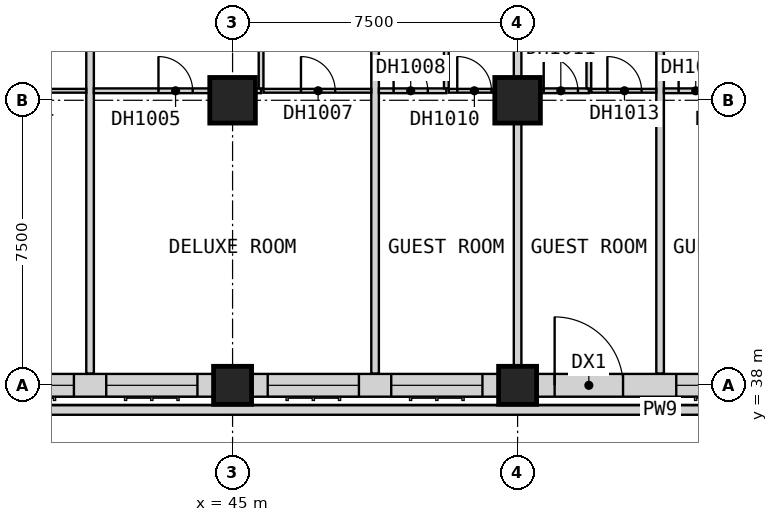
"""IFC4 building model, lengths in metres.
Left out: names, types, materials, properties, quantities, classifications, styles, units other than length and angle.
Written with IfcOpenShell. Run it as: python <this file> out.ifc"""

import sys

from ifc_helpers import new_model, si_unit, direction, frame, frame_2d, origin, origin_2d, place, context, subcontext, project, spatial, rectangle, extrude, element, fill, save


model = new_model("IFC4")
c1 = context("Model", 3, precision=1e-05, world=origin(), true_north=direction((0.0, 1.0)))
c2 = subcontext(c1, "Body", "Model", "MODEL_VIEW")
j1 = project(units=[si_unit("LENGTHUNIT", "METRE"), si_unit("PLANEANGLEUNIT", "RADIAN")], contexts=[c1])
p1 = place(None, origin())
s1 = spatial("IfcSite", under=j1, at=p1, CompositionType="ELEMENT")
p2 = place(p1, origin())
s2 = spatial("IfcBuilding", under=s1, at=p2, CompositionType="ELEMENT")
p3 = place(p2, frame((0.0, 0.0, 34.0)))
s3 = spatial("IfcBuildingStorey", under=s2, at=p3, CompositionType="ELEMENT", Elevation=34.0)
p4 = place(p3, frame((45.0, 38.0, 0.0), z_axis=(0.0, 0.0, 1.0), x_axis=(1.0, 0.0, 0.0)))
e1 = element("IfcColumn", 1, at=p4, inside=s3, PredefinedType="COLUMN", context=c2, shape_type="SweptSolid", body=[
    extrude(rectangle(XDim=1.0, YDim=1.0, at=origin_2d()), origin(), (0.0, 0.0, 1.0), 3.6),
])
p5 = place(p3, frame((45.0, 45.5, 0.0), z_axis=(0.0, 0.0, 1.0), x_axis=(1.0, 0.0, 0.0)))
e2 = element("IfcColumn", 2, at=p5, inside=s3, PredefinedType="COLUMN", context=c2, shape_type="SweptSolid", body=[
    extrude(rectangle(XDim=1.2, YDim=1.2, at=origin_2d()), origin(), (0.0, 0.0, 1.0), 3.6),
])
p6 = place(p3, frame((52.5, 38.0, 0.0), z_axis=(0.0, 0.0, 1.0), x_axis=(1.0, 0.0, 0.0)))
e3 = element("IfcColumn", 3, at=p6, inside=s3, PredefinedType="COLUMN", context=c2, shape_type="SweptSolid", body=[
    extrude(rectangle(XDim=1.0, YDim=1.0, at=origin_2d()), origin(), (0.0, 0.0, 1.0), 3.6),
])
p7 = place(p3, frame((52.5, 45.5, 0.0), z_axis=(0.0, 0.0, 1.0), x_axis=(1.0, 0.0, 0.0)))
e4 = element("IfcColumn", 4, at=p7, inside=s3, PredefinedType="COLUMN", context=c2, shape_type="SweptSolid", body=[
    extrude(rectangle(XDim=1.2, YDim=1.2, at=origin_2d()), origin(), (0.0, 0.0, 1.0), 3.6),
])
p8 = place(p3, frame((38.0, 38.0, 0.0), z_axis=(0.0, 0.0, 1.0), x_axis=(1.0, 0.0, 0.0)))
e5 = element("IfcWall", 5, at=p8, inside=s3, PredefinedType="SOLIDWALL", context=c2, shape_type="SweptSolid", body=[
    extrude(rectangle(XDim=6.5, YDim=0.6, at=frame_2d((3.25, 0.0))), origin(), (0.0, 0.0, 1.0), 2.85),
])
p9 = place(p8, frame((0.425, 0.0, 0.8)))
e6 = element("IfcOpeningElement", 6, at=p9, cuts=e5, PredefinedType="OPENING", context=c2, shape_type="SweptSolid", body=[
    extrude(rectangle(XDim=2.4, YDim=1.8, at=frame_2d((1.2, 0.9))), frame((0.0, 0.31, 0.0), z_axis=(0.0, -1.0, 0.0), x_axis=(1.0, 0.0, 0.0)), (0.0, 0.0, 1.0), 0.62),
])
p10 = place(p8, frame((3.675, 0.0, 0.8)))
e7 = element("IfcOpeningElement", 7, at=p10, cuts=e5, PredefinedType="OPENING", context=c2, shape_type="SweptSolid", body=[
    extrude(rectangle(XDim=2.4, YDim=1.8, at=frame_2d((1.2, 0.9))), frame((0.0, 0.31, 0.0), z_axis=(0.0, -1.0, 0.0), x_axis=(1.0, 0.0, 0.0)), (0.0, 0.0, 1.0), 0.62),
])
p11 = place(p3, frame((45.5, 38.0, 0.0), z_axis=(0.0, 0.0, 1.0), x_axis=(1.0, 0.0, 0.0)))
e8 = element("IfcWall", 8, at=p11, inside=s3, PredefinedType="SOLIDWALL", context=c2, shape_type="SweptSolid", body=[
    extrude(rectangle(XDim=6.5, YDim=0.6, at=frame_2d((3.25, 0.0))), origin(), (0.0, 0.0, 1.0), 2.85),
])
p12 = place(p11, frame((0.425, 0.0, 0.8)))
e9 = element("IfcOpeningElement", 9, at=p12, cuts=e8, PredefinedType="OPENING", context=c2, shape_type="SweptSolid", body=[
    extrude(rectangle(XDim=2.4, YDim=1.8, at=frame_2d((1.2, 0.9))), frame((0.0, 0.31, 0.0), z_axis=(0.0, -1.0, 0.0), x_axis=(1.0, 0.0, 0.0)), (0.0, 0.0, 1.0), 0.62),
])
p13 = place(p11, frame((3.675, 0.0, 0.8)))
e10 = element("IfcOpeningElement", 10, at=p13, cuts=e8, PredefinedType="OPENING", context=c2, shape_type="SweptSolid", body=[
    extrude(rectangle(XDim=2.4, YDim=1.8, at=frame_2d((1.2, 0.9))), frame((0.0, 0.31, 0.0), z_axis=(0.0, -1.0, 0.0), x_axis=(1.0, 0.0, 0.0)), (0.0, 0.0, 1.0), 0.62),
])
p14 = place(p3, frame((53.0, 38.0, 0.0), z_axis=(0.0, 0.0, 1.0), x_axis=(1.0, 0.0, 0.0)))
e11 = element("IfcWall", 11, at=p14, inside=s3, PredefinedType="SOLIDWALL", context=c2, shape_type="SweptSolid", body=[
    extrude(rectangle(XDim=6.5, YDim=0.6, at=frame_2d((3.25, 0.0))), origin(), (0.0, 0.0, 1.0), 2.85),
])
p15 = place(p14, frame((0.475, 0.0, 0.0)))
e12 = element("IfcOpeningElement", 12, at=p15, cuts=e11, PredefinedType="OPENING", context=c2, shape_type="SweptSolid", body=[
    extrude(rectangle(XDim=1.8, YDim=2.4, at=frame_2d((0.9, 1.2))), frame((0.0, 0.31, 0.0), z_axis=(0.0, -1.0, 0.0), x_axis=(1.0, 0.0, 0.0)), (0.0, 0.0, 1.0), 0.62),
])
p16 = place(p14, frame((3.675, 0.0, 0.8)))
e13 = element("IfcOpeningElement", 13, at=p16, cuts=e11, PredefinedType="OPENING", context=c2, shape_type="SweptSolid", body=[
    extrude(rectangle(XDim=2.4, YDim=1.8, at=frame_2d((1.2, 0.9))), frame((0.0, 0.31, 0.0), z_axis=(0.0, -1.0, 0.0), x_axis=(1.0, 0.0, 0.0)), (0.0, 0.0, 1.0), 0.62),
])
for number, where, z_axis, x_axis in (
    (14, (41.25, 38.31, 0.0), (0.0, 0.0, 1.0), (0.0, 1.0, 0.0)),
    (15, (48.75, 38.31, 0.0), (0.0, 0.0, 1.0), (0.0, 1.0, 0.0)),
):
    element("IfcWall", number, at=place(p3, frame(where, z_axis=z_axis, x_axis=x_axis)), inside=s3, PredefinedType="PARTITIONING", context=c2, shape_type="SweptSolid", body=[
        extrude(rectangle(XDim=11.715, YDim=0.2, at=frame_2d((5.857, 0.0))), origin(), (0.0, 0.0, 1.0), 3.35),
    ])
p17 = place(p3, frame((52.5, 37.5, 0.0), z_axis=(0.0, 0.0, 1.0), x_axis=(0.0, 1.0, 0.0)))
e16 = element("IfcWall", 16, at=p17, inside=s3, PredefinedType="PARTITIONING", context=c2, shape_type="SweptSolid", body=[
    extrude(rectangle(XDim=12.525, YDim=0.2, at=frame_2d((6.262, 0.0))), origin(), (0.0, 0.0, 1.0), 3.35),
])
p18 = place(p3, frame((56.25, 38.31, 0.0), z_axis=(0.0, 0.0, 1.0), x_axis=(0.0, 1.0, 0.0)))
e17 = element("IfcWall", 17, at=p18, inside=s3, PredefinedType="PARTITIONING", context=c2, shape_type="SweptSolid", body=[
    extrude(rectangle(XDim=11.715, YDim=0.2, at=frame_2d((5.857, 0.0))), origin(), (0.0, 0.0, 1.0), 3.35),
])
p19 = place(p3, frame((33.812, 45.75, 0.0), z_axis=(0.0, 0.0, 1.0), x_axis=(1.0, 0.0, 0.0)))
e18 = element("IfcWall", 18, at=p19, inside=s3, PredefinedType="PARTITIONING", context=c2, shape_type="SweptSolid", body=[
    extrude(rectangle(XDim=7.337, YDim=0.1, at=frame_2d((3.669, 0.0))), origin(), (0.0, 0.0, 1.0), 3.35),
])
p20 = place(p19, frame((5.113, 0.0, 0.0)))
e19 = element("IfcOpeningElement", 19, at=p20, cuts=e18, PredefinedType="OPENING", context=c2, shape_type="SweptSolid", body=[
    extrude(rectangle(XDim=0.9, YDim=2.1, at=frame_2d((0.45, 1.05))), frame((0.0, 0.06, 0.0), z_axis=(0.0, -1.0, 0.0), x_axis=(1.0, 0.0, 0.0)), (0.0, 0.0, 1.0), 0.12),
])
p21 = place(p3, frame((45.812, 45.75, 0.0), z_axis=(0.0, 0.0, 1.0), x_axis=(1.0, 0.0, 0.0)))
e20 = element("IfcWall", 20, at=p21, inside=s3, PredefinedType="PARTITIONING", context=c2, shape_type="SweptSolid", body=[
    extrude(rectangle(XDim=2.837, YDim=0.1, at=frame_2d((1.419, 0.0))), origin(), (0.0, 0.0, 1.0), 3.35),
])
p22 = place(p21, frame((0.988, 0.0, 0.0)))
e21 = element("IfcOpeningElement", 21, at=p22, cuts=e20, PredefinedType="OPENING", context=c2, shape_type="SweptSolid", body=[
    extrude(rectangle(XDim=0.9, YDim=2.1, at=frame_2d((0.45, 1.05))), frame((0.0, 0.06, 0.0), z_axis=(0.0, -1.0, 0.0), x_axis=(1.0, 0.0, 0.0)), (0.0, 0.0, 1.0), 0.12),
])
p23 = place(p3, frame((50.688, 45.75, 0.0), z_axis=(0.0, 0.0, 1.0), x_axis=(1.0, 0.0, 0.0)))
e22 = element("IfcWall", 22, at=p23, inside=s3, PredefinedType="PARTITIONING", context=c2, shape_type="SweptSolid", body=[
    extrude(rectangle(XDim=1.712, YDim=0.1, at=frame_2d((0.856, 0.0))), origin(), (0.0, 0.0, 1.0), 3.35),
])
p24 = place(p23, frame((0.225, 0.0, 0.0)))
e23 = element("IfcOpeningElement", 23, at=p24, cuts=e22, PredefinedType="OPENING", context=c2, shape_type="SweptSolid", body=[
    extrude(rectangle(XDim=0.9, YDim=2.1, at=frame_2d((0.45, 1.05))), frame((0.0, 0.06, 0.0), z_axis=(0.0, -1.0, 0.0), x_axis=(1.0, 0.0, 0.0)), (0.0, 0.0, 1.0), 0.12),
])
p25 = place(p3, frame((54.438, 45.75, 0.0), z_axis=(0.0, 0.0, 1.0), x_axis=(1.0, 0.0, 0.0)))
e24 = element("IfcWall", 24, at=p25, inside=s3, PredefinedType="PARTITIONING", context=c2, shape_type="SweptSolid", body=[
    extrude(rectangle(XDim=1.712, YDim=0.1, at=frame_2d((0.856, 0.0))), origin(), (0.0, 0.0, 1.0), 3.35),
])
p26 = place(p25, frame((0.425, 0.0, 0.0)))
e25 = element("IfcOpeningElement", 25, at=p26, cuts=e24, PredefinedType="OPENING", context=c2, shape_type="SweptSolid", body=[
    extrude(rectangle(XDim=0.9, YDim=2.1, at=frame_2d((0.45, 1.05))), frame((0.0, 0.06, 0.0), z_axis=(0.0, -1.0, 0.0), x_axis=(1.0, 0.0, 0.0)), (0.0, 0.0, 1.0), 0.12),
])
p27 = place(p3, frame((41.35, 45.75, 0.0), z_axis=(0.0, 0.0, 1.0), x_axis=(1.0, 0.0, 0.0)))
e26 = element("IfcWall", 26, at=p27, inside=s3, PredefinedType="PARTITIONING", context=c2, shape_type="SweptSolid", body=[
    extrude(rectangle(XDim=4.4, YDim=0.125, at=frame_2d((2.2, 0.0))), origin(), (0.0, 0.0, 1.0), 3.35),
])
p28 = place(p27, frame((1.7, 0.0, 0.0)))
e27 = element("IfcOpeningElement", 27, at=p28, cuts=e26, PredefinedType="OPENING", context=c2, shape_type="SweptSolid", body=[
    extrude(rectangle(XDim=0.9, YDim=2.1, at=frame_2d((0.45, 1.05))), frame((0.0, 0.073, 0.0), z_axis=(0.0, -1.0, 0.0), x_axis=(1.0, 0.0, 0.0)), (0.0, 0.0, 1.0), 0.145),
])
p29 = place(p3, frame((48.85, 45.75, 0.0), z_axis=(0.0, 0.0, 1.0), x_axis=(1.0, 0.0, 0.0)))
e28 = element("IfcWall", 28, at=p29, inside=s3, PredefinedType="PARTITIONING", context=c2, shape_type="SweptSolid", body=[
    extrude(rectangle(XDim=1.775, YDim=0.125, at=frame_2d((0.887, 0.0))), origin(), (0.0, 0.0, 1.0), 3.35),
])
p30 = place(p29, frame((0.387, 0.0, 0.0)))
e29 = element("IfcOpeningElement", 29, at=p30, cuts=e28, PredefinedType="OPENING", context=c2, shape_type="SweptSolid", body=[
    extrude(rectangle(XDim=0.9, YDim=2.1, at=frame_2d((0.45, 1.05))), frame((0.0, 0.073, 0.0), z_axis=(0.0, -1.0, 0.0), x_axis=(1.0, 0.0, 0.0)), (0.0, 0.0, 1.0), 0.145),
])
p31 = place(p3, frame((52.6, 45.75, 0.0), z_axis=(0.0, 0.0, 1.0), x_axis=(1.0, 0.0, 0.0)))
e30 = element("IfcWall", 30, at=p31, inside=s3, PredefinedType="PARTITIONING", context=c2, shape_type="SweptSolid", body=[
    extrude(rectangle(XDim=1.775, YDim=0.125, at=frame_2d((0.887, 0.0))), origin(), (0.0, 0.0, 1.0), 3.35),
])
p32 = place(p31, frame((0.587, 0.0, 0.0)))
e31 = element("IfcOpeningElement", 31, at=p32, cuts=e30, PredefinedType="OPENING", context=c2, shape_type="SweptSolid", body=[
    extrude(rectangle(XDim=0.9, YDim=2.1, at=frame_2d((0.45, 1.05))), frame((0.0, 0.073, 0.0), z_axis=(0.0, -1.0, 0.0), x_axis=(1.0, 0.0, 0.0)), (0.0, 0.0, 1.0), 0.145),
])
p33 = place(p3, frame((56.35, 45.75, 0.0), z_axis=(0.0, 0.0, 1.0), x_axis=(1.0, 0.0, 0.0)))
e32 = element("IfcWall", 32, at=p33, inside=s3, PredefinedType="PARTITIONING", context=c2, shape_type="SweptSolid", body=[
    extrude(rectangle(XDim=1.775, YDim=0.125, at=frame_2d((0.887, 0.0))), origin(), (0.0, 0.0, 1.0), 3.35),
])
p34 = place(p33, frame((0.387, 0.0, 0.0)))
e33 = element("IfcOpeningElement", 33, at=p34, cuts=e32, PredefinedType="OPENING", context=c2, shape_type="SweptSolid", body=[
    extrude(rectangle(XDim=0.9, YDim=2.1, at=frame_2d((0.45, 1.05))), frame((0.0, 0.073, 0.0), z_axis=(0.0, -1.0, 0.0), x_axis=(1.0, 0.0, 0.0)), (0.0, 0.0, 1.0), 0.145),
])
for number, where, z_axis, x_axis in (
    (34, (45.75, 45.812, 0.0), (0.0, 0.0, 1.0), (0.0, 1.0, 0.0)),
    (35, (50.625, 45.812, 0.0), (0.0, 0.0, 1.0), (0.0, 1.0, 0.0)),
    (36, (54.375, 45.812, 0.0), (0.0, 0.0, 1.0), (0.0, 1.0, 0.0)),
):
    element("IfcWall", number, at=place(p3, frame(where, z_axis=z_axis, x_axis=x_axis)), inside=s3, PredefinedType="PARTITIONING", context=c2, shape_type="SweptSolid", body=[
        extrude(rectangle(XDim=4.212, YDim=0.125, at=frame_2d((2.106, 0.0))), origin(), (0.0, 0.0, 1.0), 3.35),
    ])
p35 = place(p3, frame((23.125, 37.35, 0.0), z_axis=(0.0, 0.0, 1.0), x_axis=(1.0, 0.0, 0.0)))
e37 = element("IfcWall", 37, at=p35, inside=s3, PredefinedType="PARAPET", context=c2, shape_type="SweptSolid", body=[
    extrude(rectangle(XDim=66.25, YDim=0.25, at=frame_2d((33.125, 0.0))), origin(), (0.0, 0.0, 1.0), 1.2),
])
p36 = place(p9, origin())
e38 = element("IfcWindow", 38, at=p36, inside=s3, PartitioningType="SINGLE_PANEL", PredefinedType="WINDOW", context=c2, shape_type="SweptSolid", body=[
    extrude(rectangle(XDim=2.4, YDim=1.8, at=frame_2d((1.2, 0.9))), frame((0.0, -0.07, 0.0), z_axis=(0.0, -1.0, 0.0), x_axis=(1.0, 0.0, 0.0)), (0.0, 0.0, 1.0), 0.06),
])
fill(e6, e38)
p37 = place(p10, origin())
e39 = element("IfcWindow", 39, at=p37, inside=s3, PartitioningType="SINGLE_PANEL", PredefinedType="WINDOW", context=c2, shape_type="SweptSolid", body=[
    extrude(rectangle(XDim=2.4, YDim=1.8, at=frame_2d((1.2, 0.9))), frame((0.0, -0.07, 0.0), z_axis=(0.0, -1.0, 0.0), x_axis=(1.0, 0.0, 0.0)), (0.0, 0.0, 1.0), 0.06),
])
fill(e7, e39)
p38 = place(p12, origin())
e40 = element("IfcWindow", 40, at=p38, inside=s3, PartitioningType="SINGLE_PANEL", PredefinedType="WINDOW", context=c2, shape_type="SweptSolid", body=[
    extrude(rectangle(XDim=2.4, YDim=1.8, at=frame_2d((1.2, 0.9))), frame((0.0, -0.07, 0.0), z_axis=(0.0, -1.0, 0.0), x_axis=(1.0, 0.0, 0.0)), (0.0, 0.0, 1.0), 0.06),
])
fill(e9, e40)
p39 = place(p13, origin())
e41 = element("IfcWindow", 41, at=p39, inside=s3, PartitioningType="SINGLE_PANEL", PredefinedType="WINDOW", context=c2, shape_type="SweptSolid", body=[
    extrude(rectangle(XDim=2.4, YDim=1.8, at=frame_2d((1.2, 0.9))), frame((0.0, -0.07, 0.0), z_axis=(0.0, -1.0, 0.0), x_axis=(1.0, 0.0, 0.0)), (0.0, 0.0, 1.0), 0.06),
])
fill(e10, e41)
p40 = place(p15, origin())
e42 = element("IfcDoor", 42, at=p40, inside=s3, OperationType="SINGLE_SWING_LEFT", PredefinedType="DOOR", context=c2, shape_type="SweptSolid", body=[
    extrude(rectangle(XDim=1.8, YDim=2.4, at=frame_2d((0.9, 1.2))), frame((0.0, -0.075, 0.0), z_axis=(0.0, -1.0, 0.0), x_axis=(1.0, 0.0, 0.0)), (0.0, 0.0, 1.0), 0.05),
])
fill(e12, e42)
p41 = place(p16, origin())
e43 = element("IfcWindow", 43, at=p41, inside=s3, PartitioningType="SINGLE_PANEL", PredefinedType="WINDOW", context=c2, shape_type="SweptSolid", body=[
    extrude(rectangle(XDim=2.4, YDim=1.8, at=frame_2d((1.2, 0.9))), frame((0.0, -0.07, 0.0), z_axis=(0.0, -1.0, 0.0), x_axis=(1.0, 0.0, 0.0)), (0.0, 0.0, 1.0), 0.06),
])
fill(e13, e43)
p42 = place(p28, origin())
e44 = element("IfcDoor", 44, at=p42, inside=s3, OperationType="SINGLE_SWING_LEFT", PredefinedType="DOOR", context=c2, shape_type="SweptSolid", body=[
    extrude(rectangle(XDim=0.9, YDim=2.1, at=frame_2d((0.45, 1.05))), frame((0.0, 0.025, 0.0), z_axis=(0.0, -1.0, 0.0), x_axis=(1.0, 0.0, 0.0)), (0.0, 0.0, 1.0), 0.05),
])
fill(e27, e44)
p43 = place(p22, origin())
e45 = element("IfcDoor", 45, at=p43, inside=s3, OperationType="SINGLE_SWING_LEFT", PredefinedType="DOOR", context=c2, shape_type="SweptSolid", body=[
    extrude(rectangle(XDim=0.9, YDim=2.1, at=frame_2d((0.45, 1.05))), frame((0.0, 0.025, 0.0), z_axis=(0.0, -1.0, 0.0), x_axis=(1.0, 0.0, 0.0)), (0.0, 0.0, 1.0), 0.05),
])
fill(e21, e45)
p44 = place(p30, origin())
e46 = element("IfcDoor", 46, at=p44, inside=s3, OperationType="SINGLE_SWING_LEFT", PredefinedType="DOOR", context=c2, shape_type="SweptSolid", body=[
    extrude(rectangle(XDim=0.9, YDim=2.1, at=frame_2d((0.45, 1.05))), frame((0.0, 0.025, 0.0), z_axis=(0.0, -1.0, 0.0), x_axis=(1.0, 0.0, 0.0)), (0.0, 0.0, 1.0), 0.05),
])
fill(e29, e46)
p45 = place(p24, origin())
e47 = element("IfcDoor", 47, at=p45, inside=s3, OperationType="SINGLE_SWING_LEFT", PredefinedType="DOOR", context=c2, shape_type="SweptSolid", body=[
    extrude(rectangle(XDim=0.9, YDim=2.1, at=frame_2d((0.45, 1.05))), frame((0.0, 0.025, 0.0), z_axis=(0.0, -1.0, 0.0), x_axis=(1.0, 0.0, 0.0)), (0.0, 0.0, 1.0), 0.05),
])
fill(e23, e47)
p46 = place(p32, origin())
e48 = element("IfcDoor", 48, at=p46, inside=s3, OperationType="SINGLE_SWING_RIGHT", PredefinedType="DOOR", context=c2, shape_type="SweptSolid", body=[
    extrude(rectangle(XDim=0.9, YDim=2.1, at=frame_2d((0.45, 1.05))), frame((0.0, 0.025, 0.0), z_axis=(0.0, -1.0, 0.0), x_axis=(1.0, 0.0, 0.0)), (0.0, 0.0, 1.0), 0.05),
])
fill(e31, e48)
p47 = place(p26, origin())
e49 = element("IfcDoor", 49, at=p47, inside=s3, OperationType="SINGLE_SWING_LEFT", PredefinedType="DOOR", context=c2, shape_type="SweptSolid", body=[
    extrude(rectangle(XDim=0.9, YDim=2.1, at=frame_2d((0.45, 1.05))), frame((0.0, 0.025, 0.0), z_axis=(0.0, -1.0, 0.0), x_axis=(1.0, 0.0, 0.0)), (0.0, 0.0, 1.0), 0.05),
])
fill(e25, e49)
p48 = place(p34, origin())
e50 = element("IfcDoor", 50, at=p48, inside=s3, OperationType="SINGLE_SWING_LEFT", PredefinedType="DOOR", context=c2, shape_type="SweptSolid", body=[
    extrude(rectangle(XDim=0.9, YDim=2.1, at=frame_2d((0.45, 1.05))), frame((0.0, 0.025, 0.0), z_axis=(0.0, -1.0, 0.0), x_axis=(1.0, 0.0, 0.0)), (0.0, 0.0, 1.0), 0.05),
])
fill(e33, e50)
save(model, sys.argv[1])
